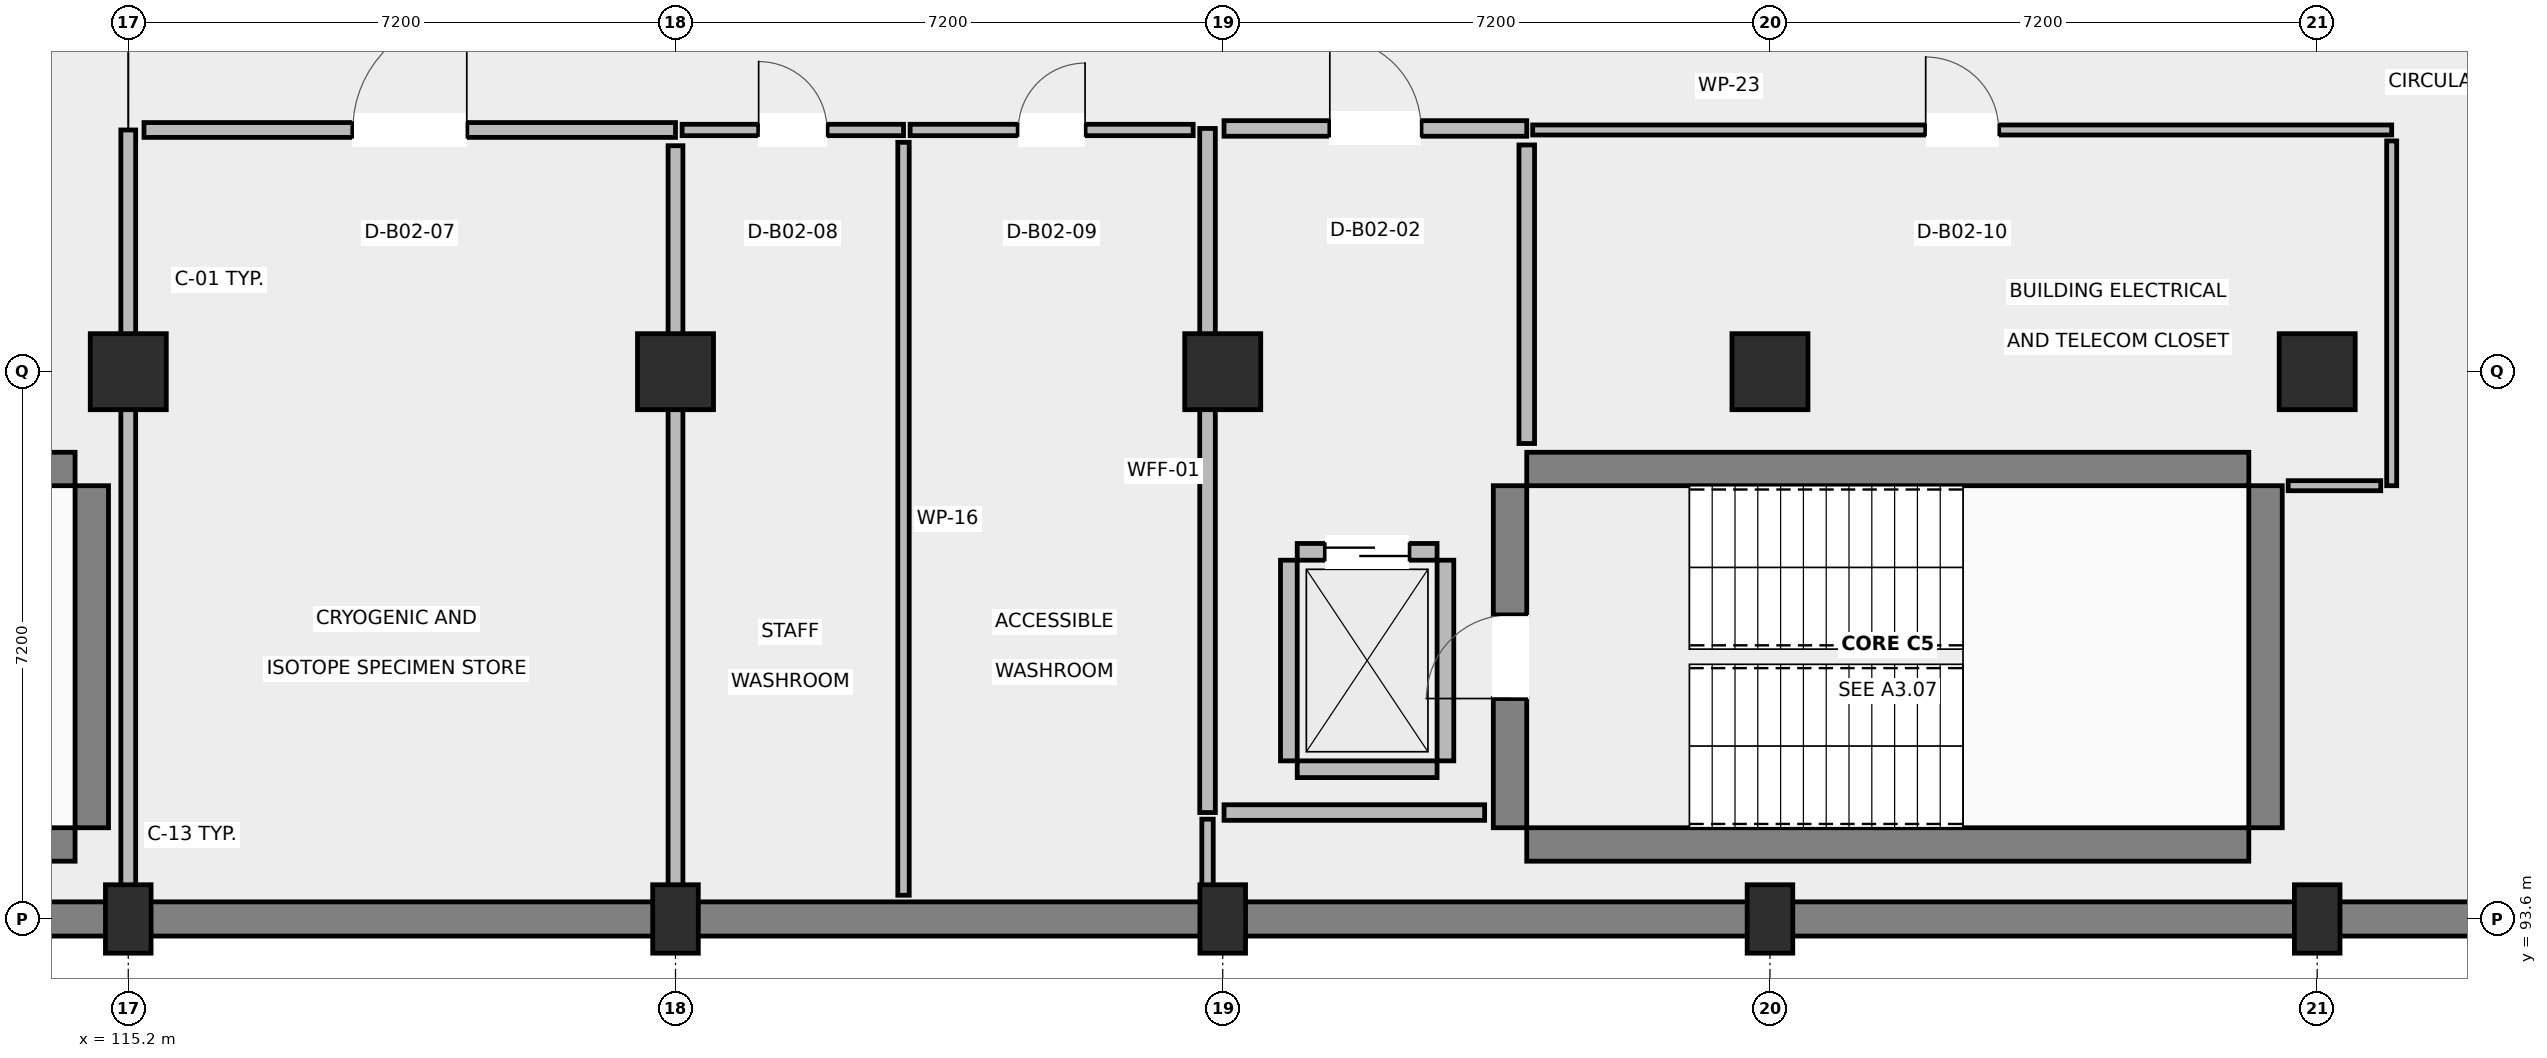
"""IFC4 building model, lengths in metres.
Left out: names, types, materials, properties, quantities, classifications, styles, units other than length and angle.
Written with IfcOpenShell. Run it as: python <this file> out.ifc"""

import sys

from ifc_helpers import new_model, si_unit, direction, frame, frame_2d, origin, origin_2d, place, context, subcontext, project, spatial, rectangle, extrude, element, fill, save


model = new_model("IFC4")
c1 = context("Model", 3, precision=1e-05, world=origin(), true_north=direction((0.0, 1.0)))
c2 = subcontext(c1, "Body", "Model", "MODEL_VIEW")
j1 = project(units=[si_unit("LENGTHUNIT", "METRE"), si_unit("PLANEANGLEUNIT", "RADIAN")], contexts=[c1])
p1 = place(None, origin())
s1 = spatial("IfcSite", under=j1, at=p1, CompositionType="ELEMENT")
p2 = place(p1, origin())
s2 = spatial("IfcBuilding", under=s1, at=p2, CompositionType="ELEMENT")
p3 = place(p2, frame((0.0, 0.0, -9.0)))
s3 = spatial("IfcBuildingStorey", under=s2, at=p3, CompositionType="ELEMENT", Elevation=-9.0)
p4 = place(p3, frame((115.2, 93.6, 0.0), z_axis=(0.0, 0.0, 1.0), x_axis=(1.0, 0.0, 0.0)))
e1 = element("IfcColumn", 1, at=p4, inside=s3, PredefinedType="COLUMN", context=c2, shape_type="SweptSolid", body=[
    extrude(rectangle(XDim=0.6, YDim=0.9, at=origin_2d()), origin(), (0.0, 0.0, 1.0), 4.15),
])
p5 = place(p3, frame((115.2, 100.8, 0.0), z_axis=(0.0, 0.0, 1.0), x_axis=(1.0, 0.0, 0.0)))
e2 = element("IfcColumn", 2, at=p5, inside=s3, PredefinedType="COLUMN", context=c2, shape_type="SweptSolid", body=[
    extrude(rectangle(XDim=1.0, YDim=1.0, at=origin_2d()), origin(), (0.0, 0.0, 1.0), 4.15),
])
p6 = place(p3, frame((122.4, 93.6, 0.0), z_axis=(0.0, 0.0, 1.0), x_axis=(1.0, 0.0, 0.0)))
e3 = element("IfcColumn", 3, at=p6, inside=s3, PredefinedType="COLUMN", context=c2, shape_type="SweptSolid", body=[
    extrude(rectangle(XDim=0.6, YDim=0.9, at=origin_2d()), origin(), (0.0, 0.0, 1.0), 4.15),
])
p7 = place(p3, frame((122.4, 100.8, 0.0), z_axis=(0.0, 0.0, 1.0), x_axis=(1.0, 0.0, 0.0)))
e4 = element("IfcColumn", 4, at=p7, inside=s3, PredefinedType="COLUMN", context=c2, shape_type="SweptSolid", body=[
    extrude(rectangle(XDim=1.0, YDim=1.0, at=origin_2d()), origin(), (0.0, 0.0, 1.0), 4.15),
])
p8 = place(p3, frame((129.6, 93.6, 0.0), z_axis=(0.0, 0.0, 1.0), x_axis=(1.0, 0.0, 0.0)))
e5 = element("IfcColumn", 5, at=p8, inside=s3, PredefinedType="COLUMN", context=c2, shape_type="SweptSolid", body=[
    extrude(rectangle(XDim=0.6, YDim=0.9, at=origin_2d()), origin(), (0.0, 0.0, 1.0), 4.15),
])
p9 = place(p3, frame((129.6, 100.8, 0.0), z_axis=(0.0, 0.0, 1.0), x_axis=(1.0, 0.0, 0.0)))
e6 = element("IfcColumn", 6, at=p9, inside=s3, PredefinedType="COLUMN", context=c2, shape_type="SweptSolid", body=[
    extrude(rectangle(XDim=1.0, YDim=1.0, at=origin_2d()), origin(), (0.0, 0.0, 1.0), 4.15),
])
p10 = place(p3, frame((136.8, 93.6, 0.0), z_axis=(0.0, 0.0, 1.0), x_axis=(1.0, 0.0, 0.0)))
e7 = element("IfcColumn", 7, at=p10, inside=s3, PredefinedType="COLUMN", context=c2, shape_type="SweptSolid", body=[
    extrude(rectangle(XDim=0.6, YDim=0.9, at=origin_2d()), origin(), (0.0, 0.0, 1.0), 4.15),
])
p11 = place(p3, frame((136.8, 100.8, 0.0), z_axis=(0.0, 0.0, 1.0), x_axis=(1.0, 0.0, 0.0)))
e8 = element("IfcColumn", 8, at=p11, inside=s3, PredefinedType="COLUMN", context=c2, shape_type="SweptSolid", body=[
    extrude(rectangle(XDim=1.0, YDim=1.0, at=origin_2d()), origin(), (0.0, 0.0, 1.0), 4.15),
])
p12 = place(p3, frame((144.0, 93.6, 0.0), z_axis=(0.0, 0.0, 1.0), x_axis=(1.0, 0.0, 0.0)))
e9 = element("IfcColumn", 9, at=p12, inside=s3, PredefinedType="COLUMN", context=c2, shape_type="SweptSolid", body=[
    extrude(rectangle(XDim=0.6, YDim=0.9, at=origin_2d()), origin(), (0.0, 0.0, 1.0), 4.15),
])
p13 = place(p3, frame((144.0, 100.8, 0.0), z_axis=(0.0, 0.0, 1.0), x_axis=(1.0, 0.0, 0.0)))
e10 = element("IfcColumn", 10, at=p13, inside=s3, PredefinedType="COLUMN", context=c2, shape_type="SweptSolid", body=[
    extrude(rectangle(XDim=1.0, YDim=1.0, at=origin_2d()), origin(), (0.0, 0.0, 1.0), 4.15),
])
p14 = place(p3, frame((86.4, 93.6, 0.0), z_axis=(0.0, 0.0, 1.0), x_axis=(1.0, 0.0, 0.0)))
e11 = element("IfcWall", 11, at=p14, inside=s3, PredefinedType="SOLIDWALL", context=c2, shape_type="SweptSolid", body=[
    extrude(rectangle(XDim=64.8, YDim=0.45, at=frame_2d((32.4, 0.0))), origin(), (0.0, 0.0, 1.0), 4.15),
])
for number, where, z_axis, x_axis in (
    (12, (105.0, 94.58, 0.0), (0.0, 0.0, 1.0), (1.0, 0.0, 0.0)),
    (13, (105.0, 99.52, 0.0), (0.0, 0.0, 1.0), (1.0, 0.0, 0.0)),
):
    element("IfcWall", number, at=place(p3, frame(where, z_axis=z_axis, x_axis=x_axis)), inside=s3, PredefinedType="SHEAR", context=c2, shape_type="SweptSolid", body=[
        extrude(rectangle(XDim=9.5, YDim=0.44, at=frame_2d((4.75, 0.0))), origin(), (0.0, 0.0, 1.0), 4.15),
    ])
p15 = place(p3, frame((114.72, 94.8, 0.0), z_axis=(0.0, 0.0, 1.0), x_axis=(0.0, 1.0, 0.0)))
e14 = element("IfcWall", 14, at=p15, inside=s3, PredefinedType="SHEAR", context=c2, shape_type="SweptSolid", body=[
    extrude(rectangle(XDim=4.5, YDim=0.44, at=frame_2d((2.25, 0.0))), origin(), (0.0, 0.0, 1.0), 4.15),
])
for number, where, z_axis, x_axis in (
    (15, (133.6, 94.58, 0.0), (0.0, 0.0, 1.0), (1.0, 0.0, 0.0)),
    (16, (133.6, 99.52, 0.0), (0.0, 0.0, 1.0), (1.0, 0.0, 0.0)),
):
    element("IfcWall", number, at=place(p3, frame(where, z_axis=z_axis, x_axis=x_axis)), inside=s3, PredefinedType="SHEAR", context=c2, shape_type="SweptSolid", body=[
        extrude(rectangle(XDim=9.5, YDim=0.44, at=frame_2d((4.75, 0.0))), origin(), (0.0, 0.0, 1.0), 4.15),
    ])
p16 = place(p3, frame((133.38, 94.8, 0.0), z_axis=(0.0, 0.0, 1.0), x_axis=(0.0, 1.0, 0.0)))
e17 = element("IfcWall", 17, at=p16, inside=s3, PredefinedType="SHEAR", context=c2, shape_type="SweptSolid", body=[
    extrude(rectangle(XDim=4.5, YDim=0.44, at=frame_2d((2.25, 0.0))), origin(), (0.0, 0.0, 1.0), 4.15),
])
p17 = place(p16, frame((1.7, 0.0, 0.0)))
e18 = element("IfcOpeningElement", 18, at=p17, cuts=e17, PredefinedType="OPENING", context=c2, shape_type="SweptSolid", body=[
    extrude(rectangle(XDim=1.1, YDim=2.15, at=frame_2d((0.55, 1.075))), frame((0.0, 0.23, 0.0), z_axis=(0.0, -1.0, 0.0), x_axis=(1.0, 0.0, 0.0)), (0.0, 0.0, 1.0), 0.46),
])
p18 = place(p3, frame((143.32, 94.8, 0.0), z_axis=(0.0, 0.0, 1.0), x_axis=(0.0, 1.0, 0.0)))
e19 = element("IfcWall", 19, at=p18, inside=s3, PredefinedType="SHEAR", context=c2, shape_type="SweptSolid", body=[
    extrude(rectangle(XDim=4.5, YDim=0.44, at=frame_2d((2.25, 0.0))), origin(), (0.0, 0.0, 1.0), 4.15),
])
p19 = place(p3, frame((130.58, 95.57, 0.0), z_axis=(0.0, 0.0, 1.0), x_axis=(1.0, 0.0, 0.0)))
e20 = element("IfcWall", 20, at=p19, inside=s3, PredefinedType="STANDARD", context=c2, shape_type="SweptSolid", body=[
    extrude(rectangle(XDim=1.84, YDim=0.22, at=frame_2d((0.92, 0.0))), origin(), (0.0, 0.0, 1.0), 3.19),
])
p20 = place(p3, frame((130.58, 98.43, 0.0), z_axis=(0.0, 0.0, 1.0), x_axis=(1.0, 0.0, 0.0)))
e21 = element("IfcWall", 21, at=p20, inside=s3, PredefinedType="STANDARD", context=c2, shape_type="SweptSolid", body=[
    extrude(rectangle(XDim=1.84, YDim=0.22, at=frame_2d((0.92, 0.0))), origin(), (0.0, 0.0, 1.0), 3.19),
])
p21 = place(p20, frame((0.37, 0.0, 0.0)))
e22 = element("IfcOpeningElement", 22, at=p21, cuts=e21, PredefinedType="OPENING", context=c2, shape_type="SweptSolid", body=[
    extrude(rectangle(XDim=1.1, YDim=2.15, at=frame_2d((0.55, 1.075))), frame((0.0, 0.12, 0.0), z_axis=(0.0, -1.0, 0.0), x_axis=(1.0, 0.0, 0.0)), (0.0, 0.0, 1.0), 0.24),
])
for number, where, z_axis, x_axis in (
    (23, (130.47, 95.68, 0.0), (0.0, 0.0, 1.0), (0.0, 1.0, 0.0)),
    (24, (132.53, 95.68, 0.0), (0.0, 0.0, 1.0), (0.0, 1.0, 0.0)),
):
    element("IfcWall", number, at=place(p3, frame(where, z_axis=z_axis, x_axis=x_axis)), inside=s3, PredefinedType="STANDARD", context=c2, shape_type="SweptSolid", body=[
        extrude(rectangle(XDim=2.64, YDim=0.22, at=frame_2d((1.32, 0.0))), origin(), (0.0, 0.0, 1.0), 3.19),
    ])
p22 = place(p3, frame((129.4, 95.0, 0.0), z_axis=(0.0, 0.0, 1.0), x_axis=(0.0, 1.0, 0.0)))
e25 = element("IfcWall", 25, at=p22, inside=s3, PredefinedType="PARTITIONING", context=c2, shape_type="SweptSolid", body=[
    extrude(rectangle(XDim=9.0, YDim=0.205, at=frame_2d((4.5, 0.0))), origin(), (0.0, 0.0, 1.0), 3.19),
])
p23 = place(p3, frame((129.617, 104.0, 0.0), z_axis=(0.0, 0.0, 1.0), x_axis=(1.0, 0.0, 0.0)))
e26 = element("IfcWall", 26, at=p23, inside=s3, PredefinedType="PARTITIONING", context=c2, shape_type="SweptSolid", body=[
    extrude(rectangle(XDim=3.983, YDim=0.205, at=frame_2d((1.992, 0.0))), origin(), (0.0, 0.0, 1.0), 3.19),
])
p24 = place(p23, frame((1.392, 0.0, 0.0)))
e27 = element("IfcOpeningElement", 27, at=p24, cuts=e26, PredefinedType="OPENING", context=c2, shape_type="SweptSolid", body=[
    extrude(rectangle(XDim=1.2, YDim=2.15, at=frame_2d((0.6, 1.075))), frame((0.0, 0.113, 0.0), z_axis=(0.0, -1.0, 0.0), x_axis=(1.0, 0.0, 0.0)), (0.0, 0.0, 1.0), 0.225),
])
p25 = place(p3, frame((133.6, 103.783, 0.0), z_axis=(0.0, 0.0, 1.0), x_axis=(0.0, -1.0, 0.0)))
e28 = element("IfcWall", 28, at=p25, inside=s3, PredefinedType="PARTITIONING", context=c2, shape_type="SweptSolid", body=[
    extrude(rectangle(XDim=3.928, YDim=0.205, at=frame_2d((1.964, 0.0))), origin(), (0.0, 0.0, 1.0), 3.19),
])
p26 = place(p3, frame((133.046, 95.0, 0.0), z_axis=(0.0, 0.0, 1.0), x_axis=(-1.0, 0.0, 0.0)))
e29 = element("IfcWall", 29, at=p26, inside=s3, PredefinedType="PARTITIONING", context=c2, shape_type="SweptSolid", body=[
    extrude(rectangle(XDim=3.429, YDim=0.205, at=frame_2d((1.714, 0.0))), origin(), (0.0, 0.0, 1.0), 3.19),
])
p27 = place(p3, frame((115.2, 93.934, 0.0), z_axis=(0.0, 0.0, 1.0), x_axis=(0.0, 1.0, 0.0)))
e30 = element("IfcWall", 30, at=p27, inside=s3, PredefinedType="PARTITIONING", context=c2, shape_type="SweptSolid", body=[
    extrude(rectangle(XDim=10.046, YDim=0.195, at=frame_2d((5.023, 0.0))), origin(), (0.0, 0.0, 1.0), 3.19),
])
p28 = place(p3, frame((115.407, 103.98, 0.0), z_axis=(0.0, 0.0, 1.0), x_axis=(1.0, 0.0, 0.0)))
e31 = element("IfcWall", 31, at=p28, inside=s3, PredefinedType="PARTITIONING", context=c2, shape_type="SweptSolid", body=[
    extrude(rectangle(XDim=6.993, YDim=0.195, at=frame_2d((3.497, 0.0))), origin(), (0.0, 0.0, 1.0), 3.19),
])
p29 = place(p28, frame((2.747, 0.0, 0.0)))
e32 = element("IfcOpeningElement", 32, at=p29, cuts=e31, PredefinedType="OPENING", context=c2, shape_type="SweptSolid", body=[
    extrude(rectangle(XDim=1.5, YDim=2.15, at=frame_2d((0.75, 1.075))), frame((0.0, 0.107, 0.0), z_axis=(0.0, -1.0, 0.0), x_axis=(1.0, 0.0, 0.0)), (0.0, 0.0, 1.0), 0.215),
])
p30 = place(p3, frame((122.4, 103.773, 0.0), z_axis=(0.0, 0.0, 1.0), x_axis=(0.0, -1.0, 0.0)))
e33 = element("IfcWall", 33, at=p30, inside=s3, PredefinedType="PARTITIONING", context=c2, shape_type="SweptSolid", body=[
    extrude(rectangle(XDim=9.839, YDim=0.195, at=frame_2d((4.919, 0.0))), origin(), (0.0, 0.0, 1.0), 3.19),
])
p31 = place(p3, frame((122.487, 103.98, 0.0), z_axis=(0.0, 0.0, 1.0), x_axis=(1.0, 0.0, 0.0)))
e34 = element("IfcWall", 34, at=p31, inside=s3, PredefinedType="PARTITIONING", context=c2, shape_type="SweptSolid", body=[
    extrude(rectangle(XDim=2.913, YDim=0.15, at=frame_2d((1.457, 0.0))), origin(), (0.0, 0.0, 1.0), 3.19),
])
p32 = place(p31, frame((1.007, 0.0, 0.0)))
e35 = element("IfcOpeningElement", 35, at=p32, cuts=e34, PredefinedType="OPENING", context=c2, shape_type="SweptSolid", body=[
    extrude(rectangle(XDim=0.9, YDim=2.1, at=frame_2d((0.45, 1.05))), frame((0.0, 0.085, 0.0), z_axis=(0.0, -1.0, 0.0), x_axis=(1.0, 0.0, 0.0)), (0.0, 0.0, 1.0), 0.17),
])
p33 = place(p3, frame((125.4, 103.818, 0.0), z_axis=(0.0, 0.0, 1.0), x_axis=(0.0, -1.0, 0.0)))
e36 = element("IfcWall", 36, at=p33, inside=s3, PredefinedType="PARTITIONING", context=c2, shape_type="SweptSolid", body=[
    extrude(rectangle(XDim=9.906, YDim=0.15, at=frame_2d((4.953, 0.0))), origin(), (0.0, 0.0, 1.0), 3.19),
])
p34 = place(p3, frame((125.487, 103.98, 0.0), z_axis=(0.0, 0.0, 1.0), x_axis=(1.0, 0.0, 0.0)))
e37 = element("IfcWall", 37, at=p34, inside=s3, PredefinedType="PARTITIONING", context=c2, shape_type="SweptSolid", body=[
    extrude(rectangle(XDim=3.724, YDim=0.15, at=frame_2d((1.862, 0.0))), origin(), (0.0, 0.0, 1.0), 3.19),
])
p35 = place(p34, frame((1.422, 0.0, 0.0)))
e38 = element("IfcOpeningElement", 38, at=p35, cuts=e37, PredefinedType="OPENING", context=c2, shape_type="SweptSolid", body=[
    extrude(rectangle(XDim=0.88, YDim=2.1, at=frame_2d((0.44, 1.05))), frame((0.0, 0.085, 0.0), z_axis=(0.0, -1.0, 0.0), x_axis=(1.0, 0.0, 0.0)), (0.0, 0.0, 1.0), 0.17),
])
p36 = place(p3, frame((129.4, 94.913, 0.0), z_axis=(0.0, 0.0, 1.0), x_axis=(0.0, -1.0, 0.0)))
e39 = element("IfcWall", 39, at=p36, inside=s3, PredefinedType="PARTITIONING", context=c2, shape_type="SweptSolid", body=[
    extrude(rectangle(XDim=1.001, YDim=0.15, at=frame_2d((0.5, 0.0))), origin(), (0.0, 0.0, 1.0), 3.19),
])
p37 = place(p3, frame((133.678, 103.98, 0.0), z_axis=(0.0, 0.0, 1.0), x_axis=(1.0, 0.0, 0.0)))
e40 = element("IfcWall", 40, at=p37, inside=s3, PredefinedType="PARTITIONING", context=c2, shape_type="SweptSolid", body=[
    extrude(rectangle(XDim=11.302, YDim=0.132, at=frame_2d((5.651, 0.0))), origin(), (0.0, 0.0, 1.0), 3.19),
])
p38 = place(p37, frame((5.171, 0.0, 0.0)))
e41 = element("IfcOpeningElement", 41, at=p38, cuts=e40, PredefinedType="OPENING", context=c2, shape_type="SweptSolid", body=[
    extrude(rectangle(XDim=0.96, YDim=2.1, at=frame_2d((0.48, 1.05))), frame((0.0, 0.076, 0.0), z_axis=(0.0, -1.0, 0.0), x_axis=(1.0, 0.0, 0.0)), (0.0, 0.0, 1.0), 0.152),
])
p39 = place(p3, frame((144.98, 103.836, 0.0), z_axis=(0.0, 0.0, 1.0), x_axis=(0.0, -1.0, 0.0)))
e42 = element("IfcWall", 42, at=p39, inside=s3, PredefinedType="PARTITIONING", context=c2, shape_type="SweptSolid", body=[
    extrude(rectangle(XDim=4.536, YDim=0.132, at=frame_2d((2.268, 0.0))), origin(), (0.0, 0.0, 1.0), 3.19),
])
p40 = place(p3, frame((144.836, 99.3, 0.0), z_axis=(0.0, 0.0, 1.0), x_axis=(-1.0, 0.0, 0.0)))
e43 = element("IfcWall", 43, at=p40, inside=s3, PredefinedType="PARTITIONING", context=c2, shape_type="SweptSolid", body=[
    extrude(rectangle(XDim=1.218, YDim=0.132, at=frame_2d((0.609, 0.0))), origin(), (0.0, 0.0, 1.0), 3.19),
])
p41 = place(p17, origin())
e44 = element("IfcDoor", 44, at=p41, inside=s3, OperationType="SINGLE_SWING_LEFT", PredefinedType="DOOR", context=c2, shape_type="SweptSolid", body=[
    extrude(rectangle(XDim=1.1, YDim=2.15, at=frame_2d((0.55, 1.075))), frame((0.0, 0.025, 0.0), z_axis=(0.0, -1.0, 0.0), x_axis=(1.0, 0.0, 0.0)), (0.0, 0.0, 1.0), 0.05),
])
fill(e18, e44)
p42 = place(p21, origin())
e45 = element("IfcDoor", 45, at=p42, inside=s3, OperationType="SLIDING_TO_LEFT", PredefinedType="DOOR", context=c2, shape_type="SweptSolid", body=[
    extrude(rectangle(XDim=1.1, YDim=2.15, at=frame_2d((0.55, 1.075))), frame((0.0, 0.025, 0.0), z_axis=(0.0, -1.0, 0.0), x_axis=(1.0, 0.0, 0.0)), (0.0, 0.0, 1.0), 0.05),
])
fill(e22, e45)
p43 = place(p24, origin())
e46 = element("IfcDoor", 46, at=p43, inside=s3, OperationType="SINGLE_SWING_LEFT", PredefinedType="DOOR", context=c2, shape_type="SweptSolid", body=[
    extrude(rectangle(XDim=1.2, YDim=2.15, at=frame_2d((0.6, 1.075))), frame((0.0, 0.025, 0.0), z_axis=(0.0, -1.0, 0.0), x_axis=(1.0, 0.0, 0.0)), (0.0, 0.0, 1.0), 0.05),
])
fill(e27, e46)
p44 = place(p29, origin())
e47 = element("IfcDoor", 47, at=p44, inside=s3, OperationType="SINGLE_SWING_RIGHT", PredefinedType="DOOR", context=c2, shape_type="SweptSolid", body=[
    extrude(rectangle(XDim=1.5, YDim=2.15, at=frame_2d((0.75, 1.075))), frame((0.0, 0.025, 0.0), z_axis=(0.0, -1.0, 0.0), x_axis=(1.0, 0.0, 0.0)), (0.0, 0.0, 1.0), 0.05),
])
fill(e32, e47)
p45 = place(p32, origin())
e48 = element("IfcDoor", 48, at=p45, inside=s3, OperationType="SINGLE_SWING_LEFT", PredefinedType="DOOR", context=c2, shape_type="SweptSolid", body=[
    extrude(rectangle(XDim=0.9, YDim=2.1, at=frame_2d((0.45, 1.05))), frame((0.0, 0.025, 0.0), z_axis=(0.0, -1.0, 0.0), x_axis=(1.0, 0.0, 0.0)), (0.0, 0.0, 1.0), 0.05),
])
fill(e35, e48)
p46 = place(p35, origin())
e49 = element("IfcDoor", 49, at=p46, inside=s3, OperationType="SINGLE_SWING_RIGHT", PredefinedType="DOOR", context=c2, shape_type="SweptSolid", body=[
    extrude(rectangle(XDim=0.88, YDim=2.1, at=frame_2d((0.44, 1.05))), frame((0.0, 0.025, 0.0), z_axis=(0.0, -1.0, 0.0), x_axis=(1.0, 0.0, 0.0)), (0.0, 0.0, 1.0), 0.05),
])
fill(e38, e49)
p47 = place(p38, origin())
e50 = element("IfcDoor", 50, at=p47, inside=s3, OperationType="SINGLE_SWING_LEFT", PredefinedType="DOOR", context=c2, shape_type="SweptSolid", body=[
    extrude(rectangle(XDim=0.96, YDim=2.1, at=frame_2d((0.48, 1.05))), frame((0.0, 0.025, 0.0), z_axis=(0.0, -1.0, 0.0), x_axis=(1.0, 0.0, 0.0)), (0.0, 0.0, 1.0), 0.05),
])
fill(e41, e50)
save(model, sys.argv[1])
